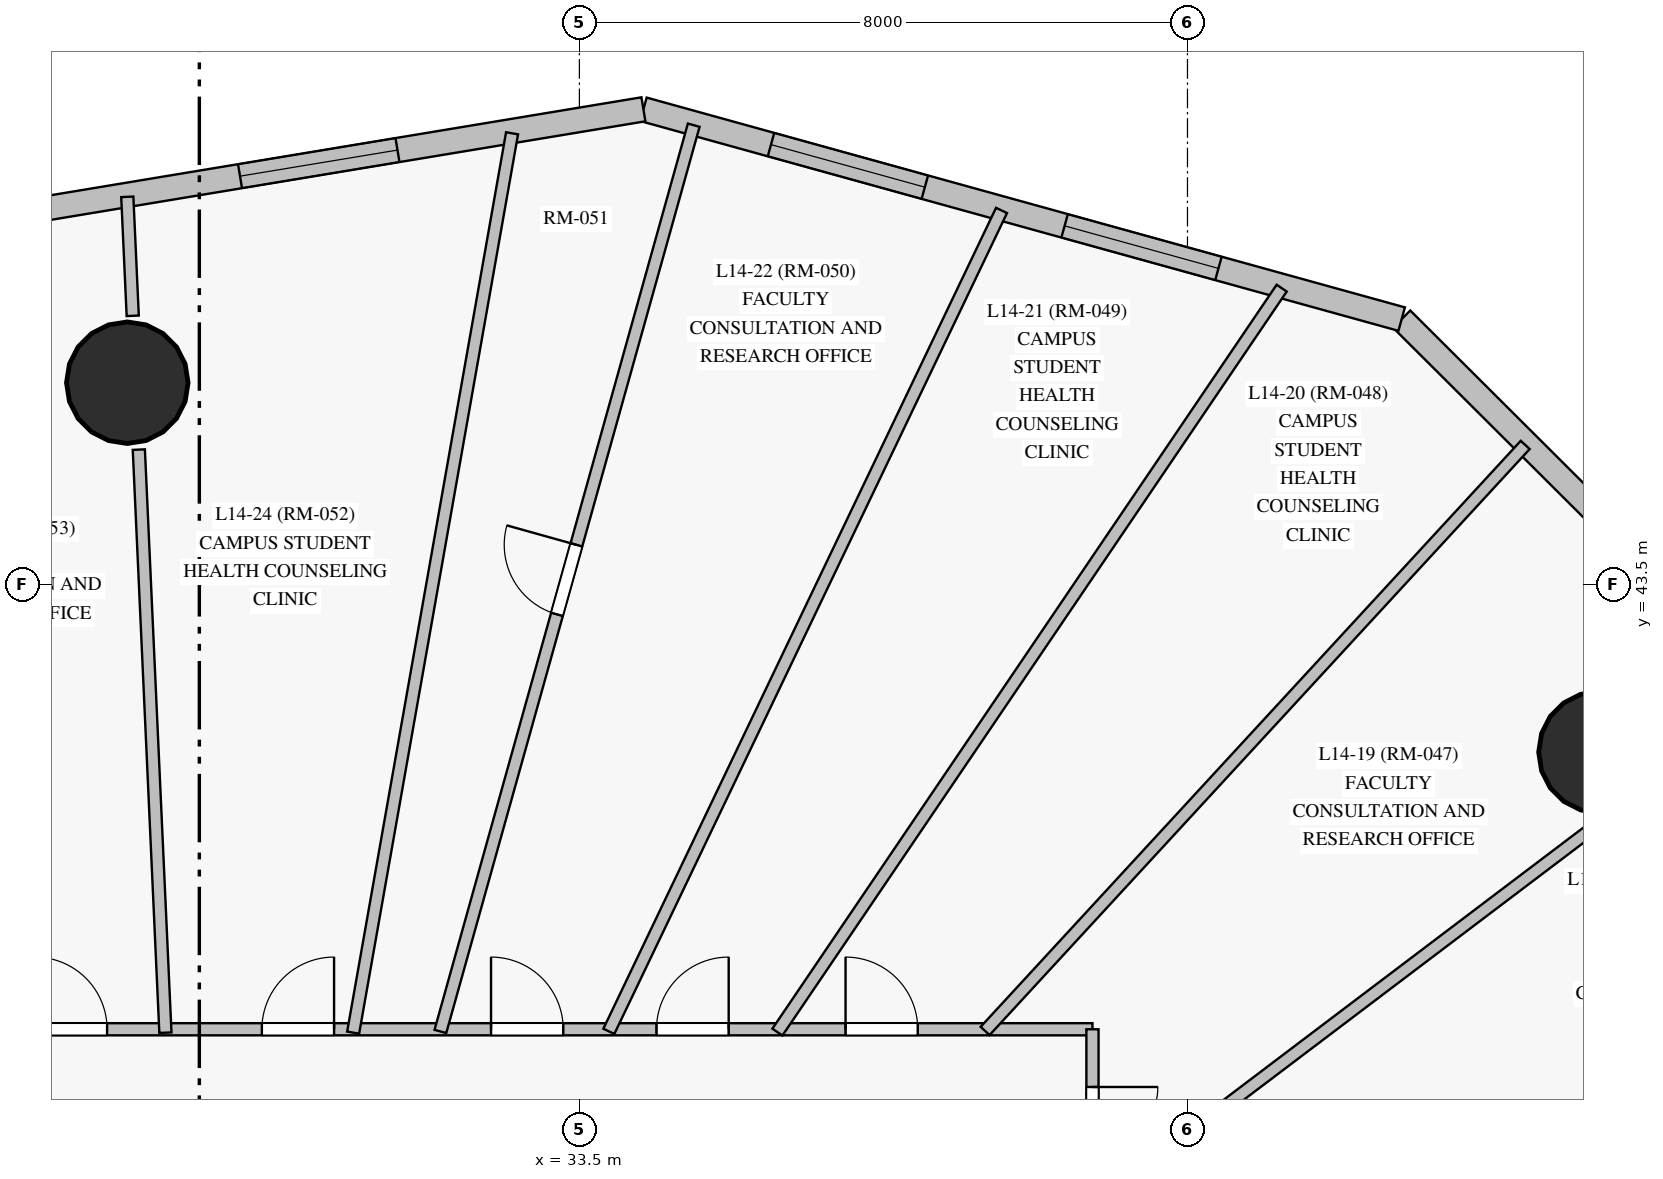
"""IFC4 building model, lengths in metres.
Left out: names, types, materials, properties, quantities, classifications, styles, units other than length and angle.
Written with IfcOpenShell. Run it as: python <this file> out.ifc"""

import sys

from ifc_helpers import new_model, si_unit, direction, frame, frame_2d, origin, origin_with_axes, origin_2d, place, context, subcontext, project, spatial, rectangle, circle, extrude, source, transform, mapped, element, fill, save


model = new_model("IFC4")
c1 = context("Model", 3, precision=1e-05, world=origin(), true_north=direction((0.0, 1.0)))
c2 = subcontext(c1, "Body", "Model", "MODEL_VIEW")
j1 = project(units=[si_unit("LENGTHUNIT", "METRE"), si_unit("PLANEANGLEUNIT", "RADIAN")], contexts=[c1])
p1 = place(None, origin())
s1 = spatial("IfcSite", under=j1, at=p1, CompositionType="ELEMENT")
p2 = place(p1, origin())
s2 = spatial("IfcBuilding", under=s1, at=p2, CompositionType="ELEMENT")
p3 = place(p2, frame((0.0, 0.0, 55.3)))
s3 = spatial("IfcBuildingStorey", under=s2, at=p3, CompositionType="ELEMENT", Elevation=55.3)
m1 = source(origin_with_axes(), c2, "Body", "SweptSolid", [
    extrude(circle(Radius=0.8, at=origin_2d()), origin(), (0.0, 0.0, 1.0), 3.6),
])
for number, where, z_axis, x_axis in (
    (1, (46.92, 41.296, 0.0), (0.0, 0.0, 1.0), (1.0, 0.0, 0.0)),
    (2, (27.552, 46.156, 0.0), (0.0, 0.0, 1.0), (1.0, 0.0, 0.0)),
):
    element("IfcColumn", number, at=place(p3, frame(where, z_axis=z_axis, x_axis=x_axis)), inside=s3, PredefinedType="COLUMN", context=c2, shape_type="MappedRepresentation", body=[
        mapped(m1, transform((0.0, 0.0, 0.0), scale=1.0)),
    ])
p4 = place(p3, frame((53.428, 37.914, 0.0), z_axis=(0.0, 0.0, 1.0), x_axis=(-0.708311107064, 0.70590040063, 0.0)))
e3 = element("IfcWall", 3, at=p4, inside=s3, PredefinedType="SOLIDWALL", context=c2, shape_type="SweptSolid", body=[
    extrude(rectangle(XDim=12.862, YDim=0.32, at=frame_2d((6.431, 0.0))), origin(), (0.0, 0.0, 1.0), 3.35),
])
p5 = place(p4, frame((2.848, 0.0, 0.85)))
e4 = element("IfcOpeningElement", 4, at=p5, cuts=e3, PredefinedType="OPENING", context=c2, shape_type="SweptSolid", body=[
    extrude(rectangle(XDim=2.1, YDim=1.95, at=frame_2d((1.05, 0.975))), frame((0.0, 0.17, 0.0), z_axis=(0.0, -1.0, 0.0), x_axis=(1.0, 0.0, 0.0)), (0.0, 0.0, 1.0), 0.34),
])
p6 = place(p4, frame((7.193, 0.0, 0.85)))
e5 = element("IfcOpeningElement", 5, at=p6, cuts=e3, PredefinedType="OPENING", context=c2, shape_type="SweptSolid", body=[
    extrude(rectangle(XDim=2.1, YDim=1.95, at=frame_2d((1.05, 0.975))), frame((0.0, 0.17, 0.0), z_axis=(0.0, -1.0, 0.0), x_axis=(1.0, 0.0, 0.0)), (0.0, 0.0, 1.0), 0.34),
])
p7 = place(p3, frame((44.318, 46.993, 0.0), z_axis=(0.0, 0.0, 1.0), x_axis=(-0.96379280772, 0.266652252546, 0.0)))
e6 = element("IfcWall", 6, at=p7, inside=s3, PredefinedType="SOLIDWALL", context=c2, shape_type="SweptSolid", body=[
    extrude(rectangle(XDim=10.351, YDim=0.32, at=frame_2d((5.175, 0.0))), origin(), (0.0, 0.0, 1.0), 3.35),
])
p8 = place(p7, frame((2.501, 0.0, 0.85)))
e7 = element("IfcOpeningElement", 7, at=p8, cuts=e6, PredefinedType="OPENING", context=c2, shape_type="SweptSolid", body=[
    extrude(rectangle(XDim=2.1, YDim=1.95, at=frame_2d((1.05, 0.975))), frame((0.0, 0.17, 0.0), z_axis=(0.0, -1.0, 0.0), x_axis=(1.0, 0.0, 0.0)), (0.0, 0.0, 1.0), 0.34),
])
p9 = place(p7, frame((6.509, 0.0, 0.85)))
e8 = element("IfcOpeningElement", 8, at=p9, cuts=e6, PredefinedType="OPENING", context=c2, shape_type="SweptSolid", body=[
    extrude(rectangle(XDim=2.1, YDim=1.95, at=frame_2d((1.05, 0.975))), frame((0.0, 0.17, 0.0), z_axis=(0.0, -1.0, 0.0), x_axis=(1.0, 0.0, 0.0)), (0.0, 0.0, 1.0), 0.34),
])
p10 = place(p3, frame((34.342, 49.753, 0.0), z_axis=(0.0, 0.0, 1.0), x_axis=(-0.986534972803, -0.163550443096, 0.0)))
e9 = element("IfcWall", 9, at=p10, inside=s3, PredefinedType="SOLIDWALL", context=c2, shape_type="SweptSolid", body=[
    extrude(rectangle(XDim=15.025, YDim=0.32, at=frame_2d((7.512, 0.0))), origin(), (0.0, 0.0, 1.0), 3.35),
])
p11 = place(p10, frame((3.28, 0.0, 0.85)))
e10 = element("IfcOpeningElement", 10, at=p11, cuts=e9, PredefinedType="OPENING", context=c2, shape_type="SweptSolid", body=[
    extrude(rectangle(XDim=2.1, YDim=1.95, at=frame_2d((1.05, 0.975))), frame((0.0, 0.17, 0.0), z_axis=(0.0, -1.0, 0.0), x_axis=(1.0, 0.0, 0.0)), (0.0, 0.0, 1.0), 0.34),
])
p12 = place(p10, frame((8.09, 0.0, 0.85)))
e11 = element("IfcOpeningElement", 11, at=p12, cuts=e9, PredefinedType="OPENING", context=c2, shape_type="SweptSolid", body=[
    extrude(rectangle(XDim=2.1, YDim=1.95, at=frame_2d((1.05, 0.975))), frame((0.0, 0.17, 0.0), z_axis=(0.0, -1.0, 0.0), x_axis=(1.0, 0.0, 0.0)), (0.0, 0.0, 1.0), 0.34),
])
p13 = place(p10, frame((12.127, 0.0, 0.85)))
e12 = element("IfcOpeningElement", 12, at=p13, cuts=e9, PredefinedType="OPENING", context=c2, shape_type="SweptSolid", body=[
    extrude(rectangle(XDim=2.1, YDim=1.95, at=frame_2d((1.05, 0.975))), frame((0.0, 0.17, 0.0), z_axis=(0.0, -1.0, 0.0), x_axis=(1.0, 0.0, 0.0)), (0.0, 0.0, 1.0), 0.34),
])
p14 = place(p3, frame((10.5, 37.65, 0.0), z_axis=(0.0, 0.0, 1.0), x_axis=(1.0, 0.0, 0.0)))
e13 = element("IfcWall", 13, at=p14, inside=s3, PredefinedType="PARTITIONING", context=c2, shape_type="SweptSolid", body=[
    extrude(rectangle(XDim=29.75, YDim=0.16, at=frame_2d((14.875, 0.0))), origin(), (0.0, 0.0, 1.0), 2.75),
])
p15 = place(p14, frame((26.502, 0.0, 0.0)))
e14 = element("IfcOpeningElement", 14, at=p15, cuts=e13, PredefinedType="OPENING", context=c2, shape_type="SweptSolid", body=[
    extrude(rectangle(XDim=0.95, YDim=2.15, at=frame_2d((0.475, 1.075))), frame((0.0, 0.09, 0.0), z_axis=(0.0, -1.0, 0.0), x_axis=(1.0, 0.0, 0.0)), (0.0, 0.0, 1.0), 0.18),
])
p16 = place(p14, frame((24.014, 0.0, 0.0)))
e15 = element("IfcOpeningElement", 15, at=p16, cuts=e13, PredefinedType="OPENING", context=c2, shape_type="SweptSolid", body=[
    extrude(rectangle(XDim=0.95, YDim=2.15, at=frame_2d((0.475, 1.075))), frame((0.0, 0.09, 0.0), z_axis=(0.0, -1.0, 0.0), x_axis=(1.0, 0.0, 0.0)), (0.0, 0.0, 1.0), 0.18),
])
p17 = place(p14, frame((21.837, 0.0, 0.0)))
e16 = element("IfcOpeningElement", 16, at=p17, cuts=e13, PredefinedType="OPENING", context=c2, shape_type="SweptSolid", body=[
    extrude(rectangle(XDim=0.95, YDim=2.15, at=frame_2d((0.475, 1.075))), frame((0.0, 0.09, 0.0), z_axis=(0.0, -1.0, 0.0), x_axis=(1.0, 0.0, 0.0)), (0.0, 0.0, 1.0), 0.18),
])
p18 = place(p14, frame((18.823, 0.0, 0.0)))
e17 = element("IfcOpeningElement", 17, at=p18, cuts=e13, PredefinedType="OPENING", context=c2, shape_type="SweptSolid", body=[
    extrude(rectangle(XDim=0.95, YDim=2.15, at=frame_2d((0.475, 1.075))), frame((0.0, 0.09, 0.0), z_axis=(0.0, -1.0, 0.0), x_axis=(1.0, 0.0, 0.0)), (0.0, 0.0, 1.0), 0.18),
])
p19 = place(p14, frame((15.836, 0.0, 0.0)))
e18 = element("IfcOpeningElement", 18, at=p19, cuts=e13, PredefinedType="OPENING", context=c2, shape_type="SweptSolid", body=[
    extrude(rectangle(XDim=0.95, YDim=2.15, at=frame_2d((0.475, 1.075))), frame((0.0, 0.09, 0.0), z_axis=(0.0, -1.0, 0.0), x_axis=(1.0, 0.0, 0.0)), (0.0, 0.0, 1.0), 0.18),
])
p20 = place(p14, frame((13.96, 0.0, 0.0)))
e19 = element("IfcOpeningElement", 19, at=p20, cuts=e13, PredefinedType="OPENING", context=c2, shape_type="SweptSolid", body=[
    extrude(rectangle(XDim=0.95, YDim=2.15, at=frame_2d((0.475, 1.075))), frame((0.0, 0.09, 0.0), z_axis=(0.0, -1.0, 0.0), x_axis=(1.0, 0.0, 0.0)), (0.0, 0.0, 1.0), 0.18),
])
p21 = place(p14, frame((9.938, 0.0, 0.0)))
e20 = element("IfcOpeningElement", 20, at=p21, cuts=e13, PredefinedType="OPENING", context=c2, shape_type="SweptSolid", body=[
    extrude(rectangle(XDim=0.95, YDim=2.15, at=frame_2d((0.475, 1.075))), frame((0.0, 0.09, 0.0), z_axis=(0.0, -1.0, 0.0), x_axis=(1.0, 0.0, 0.0)), (0.0, 0.0, 1.0), 0.18),
])
p22 = place(p14, frame((2.577, 0.0, 0.0)))
e21 = element("IfcOpeningElement", 21, at=p22, cuts=e13, PredefinedType="OPENING", context=c2, shape_type="SweptSolid", body=[
    extrude(rectangle(XDim=0.95, YDim=2.15, at=frame_2d((0.475, 1.075))), frame((0.0, 0.09, 0.0), z_axis=(0.0, -1.0, 0.0), x_axis=(1.0, 0.0, 0.0)), (0.0, 0.0, 1.0), 0.18),
])
p23 = place(p3, frame((40.25, 37.65, 0.0), z_axis=(0.0, 0.0, 1.0), x_axis=(0.0, -1.0, 0.0)))
e22 = element("IfcWall", 22, at=p23, inside=s3, PredefinedType="PARTITIONING", context=c2, shape_type="SweptSolid", body=[
    extrude(rectangle(XDim=22.3, YDim=0.16, at=frame_2d((11.15, 0.0))), origin(), (0.0, 0.0, 1.0), 2.75),
])
p24 = place(p23, frame((16.25, 0.0, 0.0)))
e23 = element("IfcOpeningElement", 23, at=p24, cuts=e22, PredefinedType="OPENING", context=c2, shape_type="SweptSolid", body=[
    extrude(rectangle(XDim=0.95, YDim=2.15, at=frame_2d((0.475, 1.075))), frame((0.0, 0.09, 0.0), z_axis=(0.0, -1.0, 0.0), x_axis=(1.0, 0.0, 0.0)), (0.0, 0.0, 1.0), 0.18),
])
p25 = place(p23, frame((13.58, 0.0, 0.0)))
e24 = element("IfcOpeningElement", 24, at=p25, cuts=e22, PredefinedType="OPENING", context=c2, shape_type="SweptSolid", body=[
    extrude(rectangle(XDim=0.95, YDim=2.15, at=frame_2d((0.475, 1.075))), frame((0.0, 0.09, 0.0), z_axis=(0.0, -1.0, 0.0), x_axis=(1.0, 0.0, 0.0)), (0.0, 0.0, 1.0), 0.18),
])
p26 = place(p23, frame((10.151, 0.0, 0.0)))
e25 = element("IfcOpeningElement", 25, at=p26, cuts=e22, PredefinedType="OPENING", context=c2, shape_type="SweptSolid", body=[
    extrude(rectangle(XDim=0.86, YDim=2.1, at=frame_2d((0.43, 1.05))), frame((0.0, 0.09, 0.0), z_axis=(0.0, -1.0, 0.0), x_axis=(1.0, 0.0, 0.0)), (0.0, 0.0, 1.0), 0.18),
])
p27 = place(p23, frame((8.711, 0.0, 0.0)))
e26 = element("IfcOpeningElement", 26, at=p27, cuts=e22, PredefinedType="OPENING", context=c2, shape_type="SweptSolid", body=[
    extrude(rectangle(XDim=0.86, YDim=2.1, at=frame_2d((0.43, 1.05))), frame((0.0, 0.09, 0.0), z_axis=(0.0, -1.0, 0.0), x_axis=(1.0, 0.0, 0.0)), (0.0, 0.0, 1.0), 0.18),
])
p28 = place(p23, frame((3.39, 0.0, 0.0)))
e27 = element("IfcOpeningElement", 27, at=p28, cuts=e22, PredefinedType="OPENING", context=c2, shape_type="SweptSolid", body=[
    extrude(rectangle(XDim=0.95, YDim=2.15, at=frame_2d((0.475, 1.075))), frame((0.0, 0.09, 0.0), z_axis=(0.0, -1.0, 0.0), x_axis=(1.0, 0.0, 0.0)), (0.0, 0.0, 1.0), 0.18),
])
p29 = place(p23, frame((0.759, 0.0, 0.0)))
e28 = element("IfcOpeningElement", 28, at=p29, cuts=e22, PredefinedType="OPENING", context=c2, shape_type="SweptSolid", body=[
    extrude(rectangle(XDim=0.86, YDim=2.1, at=frame_2d((0.43, 1.05))), frame((0.0, 0.09, 0.0), z_axis=(0.0, -1.0, 0.0), x_axis=(1.0, 0.0, 0.0)), (0.0, 0.0, 1.0), 0.18),
])
p30 = place(p23, frame((15.09, 0.0, 0.0)))
e29 = element("IfcOpeningElement", 29, at=p30, cuts=e22, PredefinedType="OPENING", context=c2, shape_type="SweptSolid", body=[
    extrude(rectangle(XDim=0.95, YDim=2.15, at=frame_2d((0.475, 1.075))), frame((0.0, 0.09, 0.0), z_axis=(0.0, -1.0, 0.0), x_axis=(1.0, 0.0, 0.0)), (0.0, 0.0, 1.0), 0.18),
])
p31 = place(p23, frame((17.345, 0.0, 0.0)))
e30 = element("IfcOpeningElement", 30, at=p31, cuts=e22, PredefinedType="OPENING", context=c2, shape_type="SweptSolid", body=[
    extrude(rectangle(XDim=0.95, YDim=2.15, at=frame_2d((0.475, 1.075))), frame((0.0, 0.09, 0.0), z_axis=(0.0, -1.0, 0.0), x_axis=(1.0, 0.0, 0.0)), (0.0, 0.0, 1.0), 0.18),
])
p32 = place(p23, frame((18.437, 0.0, 0.0)))
e31 = element("IfcOpeningElement", 31, at=p32, cuts=e22, PredefinedType="OPENING", context=c2, shape_type="SweptSolid", body=[
    extrude(rectangle(XDim=0.95, YDim=2.15, at=frame_2d((0.475, 1.075))), frame((0.0, 0.09, 0.0), z_axis=(0.0, -1.0, 0.0), x_axis=(1.0, 0.0, 0.0)), (0.0, 0.0, 1.0), 0.18),
])
p33 = place(p23, frame((6.529, 0.0, 0.0)))
e32 = element("IfcOpeningElement", 32, at=p33, cuts=e22, PredefinedType="OPENING", context=c2, shape_type="SweptSolid", body=[
    extrude(rectangle(XDim=0.86, YDim=2.04, at=frame_2d((0.43, 1.02))), frame((0.0, 0.09, 0.0), z_axis=(0.0, -1.0, 0.0), x_axis=(1.0, 0.0, 0.0)), (0.0, 0.0, 1.0), 0.18),
])
p34 = place(p3, frame((40.208, 31.347, 0.0), z_axis=(0.0, 0.0, 1.0), x_axis=(0.922132774038, 0.386873554337, 0.0)))
e33 = element("IfcWall", 33, at=p34, inside=s3, PredefinedType="PARTITIONING", context=c2, shape_type="SweptSolid", body=[
    extrude(rectangle(XDim=14.364, YDim=0.16, at=frame_2d((7.182, 0.0))), origin(), (0.0, 0.0, 1.0), 3.35),
])
p35 = place(p3, frame((40.224, 32.77, 0.0), z_axis=(0.0, 0.0, 1.0), x_axis=(0.879664206946, 0.47559529331, 0.0)))
e34 = element("IfcWall", 34, at=p35, inside=s3, PredefinedType="PARTITIONING", context=c2, shape_type="SweptSolid", body=[
    extrude(rectangle(XDim=13.506, YDim=0.16, at=frame_2d((6.753, 0.0))), origin(), (0.0, 0.0, 1.0), 3.35),
])
p36 = place(p35, frame((6.323, 0.0, 0.0)))
e35 = element("IfcOpeningElement", 35, at=p36, cuts=e34, PredefinedType="OPENING", context=c2, shape_type="SweptSolid", body=[
    extrude(rectangle(XDim=0.86, YDim=2.04, at=frame_2d((0.43, 1.02))), frame((0.0, 0.09, 0.0), z_axis=(0.0, -1.0, 0.0), x_axis=(1.0, 0.0, 0.0)), (0.0, 0.0, 1.0), 0.18),
])
p37 = place(p3, frame((31.671, 37.621, 0.0), z_axis=(0.0, 0.0, 1.0), x_axis=(0.269226126179, 0.96307699224, 0.0)))
e36 = element("IfcWall", 36, at=p37, inside=s3, PredefinedType="PARTITIONING", context=c2, shape_type="SweptSolid", body=[
    extrude(rectangle(XDim=12.38, YDim=0.16, at=frame_2d((6.19, 0.0))), origin(), (0.0, 0.0, 1.0), 3.35),
])
p38 = place(p37, frame((5.698, 0.0, 0.0)))
e37 = element("IfcOpeningElement", 37, at=p38, cuts=e36, PredefinedType="OPENING", context=c2, shape_type="SweptSolid", body=[
    extrude(rectangle(XDim=0.95, YDim=2.15, at=frame_2d((0.475, 1.075))), frame((0.0, 0.09, 0.0), z_axis=(0.0, -1.0, 0.0), x_axis=(1.0, 0.0, 0.0)), (0.0, 0.0, 1.0), 0.18),
])
p39 = place(p3, frame((30.523, 37.606, 0.0), z_axis=(0.0, 0.0, 1.0), x_axis=(0.174016002938, 0.984742824661, 0.0)))
e38 = element("IfcWall", 38, at=p39, inside=s3, PredefinedType="PARTITIONING", context=c2, shape_type="SweptSolid", body=[
    extrude(rectangle(XDim=12.015, YDim=0.16, at=frame_2d((6.008, 0.0))), origin(), (0.0, 0.0, 1.0), 3.35),
])
p40 = place(p3, frame((33.887, 37.623, 0.0), z_axis=(0.0, 0.0, 1.0), x_axis=(0.431532706121, 0.90209729162, 0.0)))
e39 = element("IfcWall", 39, at=p40, inside=s3, PredefinedType="PARTITIONING", context=c2, shape_type="SweptSolid", body=[
    extrude(rectangle(XDim=11.972, YDim=0.16, at=frame_2d((5.986, 0.0))), origin(), (0.0, 0.0, 1.0), 3.35),
])
p41 = place(p3, frame((36.105, 37.613, 0.0), z_axis=(0.0, 0.0, 1.0), x_axis=(0.561087811849, 0.827756285023, 0.0)))
e40 = element("IfcWall", 40, at=p41, inside=s3, PredefinedType="PARTITIONING", context=c2, shape_type="SweptSolid", body=[
    extrude(rectangle(XDim=11.824, YDim=0.16, at=frame_2d((5.912, 0.0))), origin(), (0.0, 0.0, 1.0), 3.35),
])
p42 = place(p3, frame((38.838, 37.628, 0.0), z_axis=(0.0, 0.0, 1.0), x_axis=(0.677727677692, 0.735312991107, 0.0)))
e41 = element("IfcWall", 41, at=p42, inside=s3, PredefinedType="PARTITIONING", context=c2, shape_type="SweptSolid", body=[
    extrude(rectangle(XDim=10.485, YDim=0.16, at=frame_2d((5.242, 0.0))), origin(), (0.0, 0.0, 1.0), 3.35),
])
p43 = place(p3, frame((40.226, 35.298, 0.0), z_axis=(0.0, 0.0, 1.0), x_axis=(0.797440445862, 0.603397659346, 0.0)))
e42 = element("IfcWall", 42, at=p43, inside=s3, PredefinedType="PARTITIONING", context=c2, shape_type="SweptSolid", body=[
    extrude(rectangle(XDim=8.483, YDim=0.16, at=frame_2d((4.241, 0.0))), origin(), (0.0, 0.0, 1.0), 3.35),
])
p44 = place(p3, frame((28.054, 37.605, 0.0), z_axis=(0.0, 0.0, 1.0), x_axis=(-0.045560532903, 0.998961579763, 0.0)))
e43 = element("IfcWall", 43, at=p44, inside=s3, PredefinedType="PARTITIONING", context=c2, shape_type="SweptSolid", body=[
    extrude(rectangle(XDim=7.679, YDim=0.16, at=frame_2d((3.839, 0.0))), origin(), (0.0, 0.0, 1.0), 2.7),
])
p45 = place(p3, frame((27.624, 47.036, 0.0), z_axis=(0.0, 0.0, 1.0), x_axis=(-0.045640834064, 0.998957914162, 0.0)))
e44 = element("IfcWall", 44, at=p45, inside=s3, PredefinedType="PARTITIONING", context=c2, shape_type="SweptSolid", body=[
    extrude(rectangle(XDim=1.567, YDim=0.16, at=frame_2d((0.784, 0.0))), origin(), (0.0, 0.0, 1.0), 3.35),
])
m2 = source(origin_with_axes(), c2, "Body", "SweptSolid", [
    extrude(rectangle(XDim=2.1, YDim=1.95, at=frame_2d((1.05, 0.975))), frame((0.0, 0.03, 0.0), z_axis=(0.0, -1.0, 0.0), x_axis=(1.0, 0.0, 0.0)), (0.0, 0.0, 1.0), 0.06),
])
p46 = place(p8, origin())
e45 = element("IfcWindow", 45, at=p46, inside=s3, PartitioningType="SINGLE_PANEL", PredefinedType="WINDOW", context=c2, shape_type="MappedRepresentation", body=[
    mapped(m2, transform((0.0, 0.0, 0.0), scale=1.0)),
])
fill(e7, e45)
p47 = place(p9, origin())
e46 = element("IfcWindow", 46, at=p47, inside=s3, PartitioningType="SINGLE_PANEL", PredefinedType="WINDOW", context=c2, shape_type="MappedRepresentation", body=[
    mapped(m2, transform((0.0, 0.0, 0.0), scale=1.0)),
])
fill(e8, e46)
p48 = place(p11, origin())
e47 = element("IfcWindow", 47, at=p48, inside=s3, PartitioningType="SINGLE_PANEL", PredefinedType="WINDOW", context=c2, shape_type="MappedRepresentation", body=[
    mapped(m2, transform((0.0, 0.0, 0.0), scale=1.0)),
])
fill(e10, e47)
m3 = source(origin_with_axes(), c2, "Body", "SweptSolid", [
    extrude(rectangle(XDim=0.86, YDim=2.1, at=frame_2d((0.43, 1.05))), frame((0.0, 0.025, 0.0), z_axis=(0.0, -1.0, 0.0), x_axis=(1.0, 0.0, 0.0)), (0.0, 0.0, 1.0), 0.05),
])
p49 = place(p29, origin())
e48 = element("IfcDoor", 48, at=p49, inside=s3, OperationType="SINGLE_SWING_LEFT", PredefinedType="DOOR", context=c2, shape_type="MappedRepresentation", body=[
    mapped(m3, transform((0.0, 0.0, 0.0), scale=1.0)),
])
fill(e28, e48)
m4 = source(origin_with_axes(), c2, "Body", "SweptSolid", [
    extrude(rectangle(XDim=0.95, YDim=2.15, at=frame_2d((0.475, 1.075))), frame((0.0, 0.025, 0.0), z_axis=(0.0, -1.0, 0.0), x_axis=(1.0, 0.0, 0.0)), (0.0, 0.0, 1.0), 0.05),
])
p50 = place(p15, origin())
e49 = element("IfcDoor", 49, at=p50, inside=s3, OperationType="SINGLE_SWING_LEFT", PredefinedType="DOOR", context=c2, shape_type="MappedRepresentation", body=[
    mapped(m4, transform((0.0, 0.0, 0.0), scale=1.0)),
])
fill(e14, e49)
p51 = place(p16, origin())
e50 = element("IfcDoor", 50, at=p51, inside=s3, OperationType="SINGLE_SWING_RIGHT", PredefinedType="DOOR", context=c2, shape_type="MappedRepresentation", body=[
    mapped(m4, transform((0.0, 0.0, 0.0), scale=1.0)),
])
fill(e15, e50)
p52 = place(p17, origin())
e51 = element("IfcDoor", 51, at=p52, inside=s3, OperationType="SINGLE_SWING_LEFT", PredefinedType="DOOR", context=c2, shape_type="MappedRepresentation", body=[
    mapped(m4, transform((0.0, 0.0, 0.0), scale=1.0)),
])
fill(e16, e51)
p53 = place(p18, origin())
e52 = element("IfcDoor", 52, at=p53, inside=s3, OperationType="SINGLE_SWING_RIGHT", PredefinedType="DOOR", context=c2, shape_type="MappedRepresentation", body=[
    mapped(m4, transform((0.0, 0.0, 0.0), scale=1.0)),
])
fill(e17, e52)
p54 = place(p19, origin())
e53 = element("IfcDoor", 53, at=p54, inside=s3, OperationType="SINGLE_SWING_LEFT", PredefinedType="DOOR", context=c2, shape_type="MappedRepresentation", body=[
    mapped(m4, transform((0.0, 0.0, 0.0), scale=1.0)),
])
fill(e18, e53)
p55 = place(p38, origin())
e54 = element("IfcDoor", 54, at=p55, inside=s3, OperationType="SINGLE_SWING_RIGHT", PredefinedType="DOOR", context=c2, shape_type="MappedRepresentation", body=[
    mapped(m4, transform((0.0, 0.0, 0.0), scale=1.0)),
])
fill(e37, e54)
save(model, sys.argv[1])
